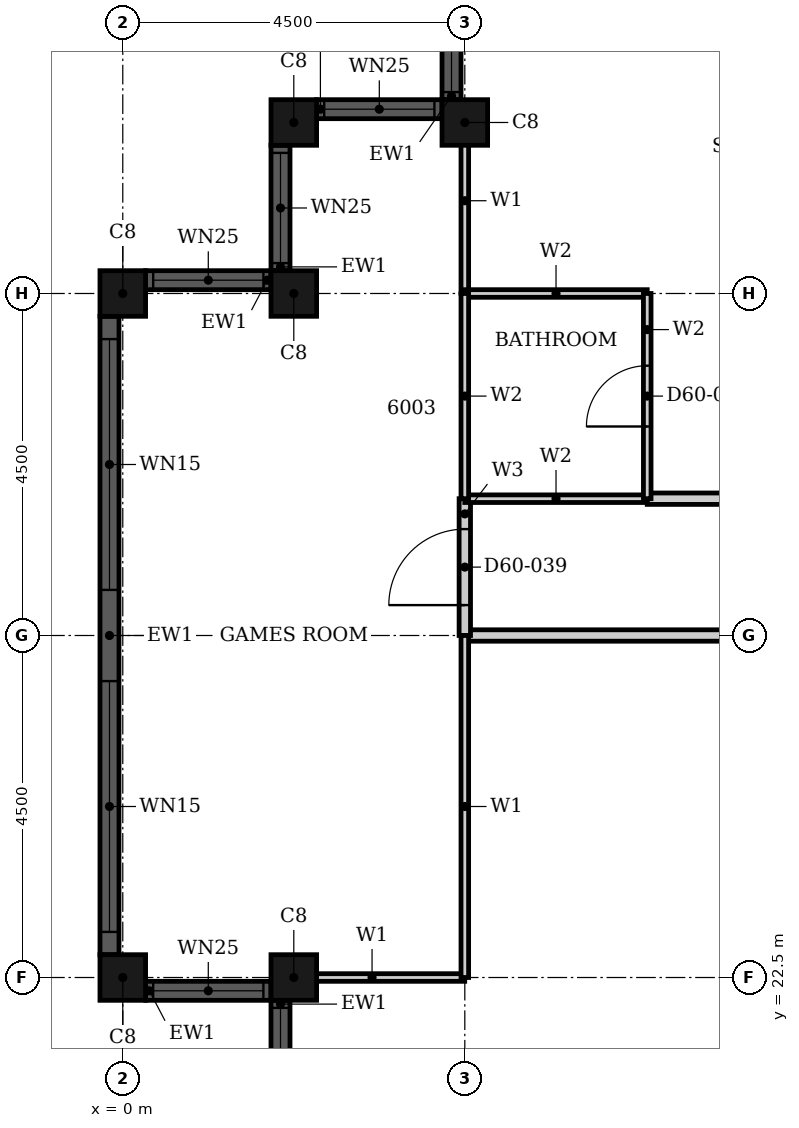
"""IFC4 building model, lengths in metres.
Left out: names, types, materials, properties, quantities, classifications, styles, units other than length and angle.
Written with IfcOpenShell. Run it as: python <this file> out.ifc"""

import sys

from ifc_helpers import new_model, si_unit, direction, frame, frame_2d, origin, origin_2d, place, context, subcontext, project, spatial, rectangle, hollow_rectangle, extrude, element, fill, save


model = new_model("IFC4")
c1 = context("Model", 3, precision=1e-05, world=origin(), true_north=direction((0.0, 1.0)))
c2 = subcontext(c1, "Body", "Model", "MODEL_VIEW")
j1 = project(units=[si_unit("LENGTHUNIT", "METRE"), si_unit("PLANEANGLEUNIT", "RADIAN")], contexts=[c1])
p1 = place(None, origin())
s1 = spatial("IfcSite", under=j1, at=p1, CompositionType="ELEMENT")
p2 = place(p1, origin())
s2 = spatial("IfcBuilding", under=s1, at=p2, CompositionType="ELEMENT")
p3 = place(p2, frame((0.0, 0.0, 237.9)))
s3 = spatial("IfcBuildingStorey", under=s2, at=p3, CompositionType="ELEMENT", Elevation=237.9)
for number, where, z_axis, x_axis in (
    (1, (4.5, 33.75, 0.0), (0.0, 0.0, 1.0), (1.0, 0.0, 0.0)),
    (2, (2.25, 33.75, 0.0), (0.0, 0.0, 1.0), (1.0, 0.0, 0.0)),
    (3, (2.25, 31.5, 0.0), (0.0, 0.0, 1.0), (1.0, 0.0, 0.0)),
    (4, (0.0, 31.5, 0.0), (0.0, 0.0, 1.0), (1.0, 0.0, 0.0)),
    (5, (0.0, 22.5, 0.0), (0.0, 0.0, 1.0), (1.0, 0.0, 0.0)),
    (6, (2.25, 22.5, 0.0), (0.0, 0.0, 1.0), (1.0, 0.0, 0.0)),
):
    element("IfcColumn", number, at=place(p3, frame(where, z_axis=z_axis, x_axis=x_axis)), inside=s3, PredefinedType="COLUMN", context=c2, shape_type="SweptSolid", body=[
        extrude(hollow_rectangle(XDim=0.6, YDim=0.6, WallThickness=0.02, at=origin_2d()), origin(), (0.0, 0.0, 1.0), 3.7),
    ])
p4 = place(p3, frame((4.325, 35.7, 0.0), z_axis=(0.0, 0.0, 1.0), x_axis=(0.0, -1.0, 0.0)))
e7 = element("IfcWall", 7, at=p4, inside=s3, PredefinedType="SOLIDWALL", context=c2, shape_type="SweptSolid", body=[
    extrude(rectangle(XDim=1.65, YDim=0.25, at=frame_2d((0.825, 0.0))), origin(), (0.0, 0.0, 1.0), 3.7),
])
p5 = place(p4, frame((0.1, 0.0, 0.9)))
e8 = element("IfcOpeningElement", 8, at=p5, cuts=e7, PredefinedType="OPENING", context=c2, shape_type="SweptSolid", body=[
    extrude(rectangle(XDim=1.45, YDim=1.85, at=frame_2d((0.725, 0.925))), frame((0.0, 0.135, 0.0), z_axis=(0.0, -1.0, 0.0), x_axis=(1.0, 0.0, 0.0)), (0.0, 0.0, 1.0), 0.27),
])
p6 = place(p3, frame((4.2, 33.925, 0.0), z_axis=(0.0, 0.0, 1.0), x_axis=(-1.0, 0.0, 0.0)))
e9 = element("IfcWall", 9, at=p6, inside=s3, PredefinedType="SOLIDWALL", context=c2, shape_type="SweptSolid", body=[
    extrude(rectangle(XDim=1.65, YDim=0.25, at=frame_2d((0.825, 0.0))), origin(), (0.0, 0.0, 1.0), 3.7),
])
p7 = place(p6, frame((0.1, 0.0, 0.9)))
e10 = element("IfcOpeningElement", 10, at=p7, cuts=e9, PredefinedType="OPENING", context=c2, shape_type="SweptSolid", body=[
    extrude(rectangle(XDim=1.45, YDim=1.85, at=frame_2d((0.725, 0.925))), frame((0.0, 0.135, 0.0), z_axis=(0.0, -1.0, 0.0), x_axis=(1.0, 0.0, 0.0)), (0.0, 0.0, 1.0), 0.27),
])
p8 = place(p3, frame((2.075, 33.45, 0.0), z_axis=(0.0, 0.0, 1.0), x_axis=(0.0, -1.0, 0.0)))
e11 = element("IfcWall", 11, at=p8, inside=s3, PredefinedType="SOLIDWALL", context=c2, shape_type="SweptSolid", body=[
    extrude(rectangle(XDim=1.65, YDim=0.25, at=frame_2d((0.825, 0.0))), origin(), (0.0, 0.0, 1.0), 3.7),
])
p9 = place(p8, frame((0.1, 0.0, 0.9)))
e12 = element("IfcOpeningElement", 12, at=p9, cuts=e11, PredefinedType="OPENING", context=c2, shape_type="SweptSolid", body=[
    extrude(rectangle(XDim=1.45, YDim=1.85, at=frame_2d((0.725, 0.925))), frame((0.0, 0.135, 0.0), z_axis=(0.0, -1.0, 0.0), x_axis=(1.0, 0.0, 0.0)), (0.0, 0.0, 1.0), 0.27),
])
p10 = place(p3, frame((1.95, 31.675, 0.0), z_axis=(0.0, 0.0, 1.0), x_axis=(-1.0, 0.0, 0.0)))
e13 = element("IfcWall", 13, at=p10, inside=s3, PredefinedType="SOLIDWALL", context=c2, shape_type="SweptSolid", body=[
    extrude(rectangle(XDim=1.65, YDim=0.25, at=frame_2d((0.825, 0.0))), origin(), (0.0, 0.0, 1.0), 3.7),
])
p11 = place(p10, frame((0.1, 0.0, 0.9)))
e14 = element("IfcOpeningElement", 14, at=p11, cuts=e13, PredefinedType="OPENING", context=c2, shape_type="SweptSolid", body=[
    extrude(rectangle(XDim=1.45, YDim=1.85, at=frame_2d((0.725, 0.925))), frame((0.0, 0.135, 0.0), z_axis=(0.0, -1.0, 0.0), x_axis=(1.0, 0.0, 0.0)), (0.0, 0.0, 1.0), 0.27),
])
p12 = place(p3, frame((-0.175, 31.2, 0.0), z_axis=(0.0, 0.0, 1.0), x_axis=(0.0, -1.0, 0.0)))
e15 = element("IfcWall", 15, at=p12, inside=s3, PredefinedType="SOLIDWALL", context=c2, shape_type="SweptSolid", body=[
    extrude(rectangle(XDim=8.4, YDim=0.25, at=frame_2d((4.2, 0.0))), origin(), (0.0, 0.0, 1.0), 3.7),
])
p13 = place(p12, frame((0.3, 0.0, 0.45)))
e16 = element("IfcOpeningElement", 16, at=p13, cuts=e15, PredefinedType="OPENING", context=c2, shape_type="SweptSolid", body=[
    extrude(rectangle(XDim=3.3, YDim=2.3, at=frame_2d((1.65, 1.15))), frame((0.0, 0.135, 0.0), z_axis=(0.0, -1.0, 0.0), x_axis=(1.0, 0.0, 0.0)), (0.0, 0.0, 1.0), 0.27),
])
p14 = place(p12, frame((4.8, 0.0, 0.45)))
e17 = element("IfcOpeningElement", 17, at=p14, cuts=e15, PredefinedType="OPENING", context=c2, shape_type="SweptSolid", body=[
    extrude(rectangle(XDim=3.3, YDim=2.3, at=frame_2d((1.65, 1.15))), frame((0.0, 0.135, 0.0), z_axis=(0.0, -1.0, 0.0), x_axis=(1.0, 0.0, 0.0)), (0.0, 0.0, 1.0), 0.27),
])
p15 = place(p3, frame((0.3, 22.325, 0.0), z_axis=(0.0, 0.0, 1.0), x_axis=(1.0, 0.0, 0.0)))
e18 = element("IfcWall", 18, at=p15, inside=s3, PredefinedType="SOLIDWALL", context=c2, shape_type="SweptSolid", body=[
    extrude(rectangle(XDim=1.65, YDim=0.25, at=frame_2d((0.825, 0.0))), origin(), (0.0, 0.0, 1.0), 3.7),
])
p16 = place(p15, frame((0.1, 0.0, 0.9)))
e19 = element("IfcOpeningElement", 19, at=p16, cuts=e18, PredefinedType="OPENING", context=c2, shape_type="SweptSolid", body=[
    extrude(rectangle(XDim=1.45, YDim=1.85, at=frame_2d((0.725, 0.925))), frame((0.0, 0.135, 0.0), z_axis=(0.0, -1.0, 0.0), x_axis=(1.0, 0.0, 0.0)), (0.0, 0.0, 1.0), 0.27),
])
p17 = place(p3, frame((2.075, 22.2, 0.0), z_axis=(0.0, 0.0, 1.0), x_axis=(0.0, -1.0, 0.0)))
e20 = element("IfcWall", 20, at=p17, inside=s3, PredefinedType="SOLIDWALL", context=c2, shape_type="SweptSolid", body=[
    extrude(rectangle(XDim=1.65, YDim=0.25, at=frame_2d((0.825, 0.0))), origin(), (0.0, 0.0, 1.0), 3.7),
])
p18 = place(p17, frame((0.1, 0.0, 0.9)))
e21 = element("IfcOpeningElement", 21, at=p18, cuts=e20, PredefinedType="OPENING", context=c2, shape_type="SweptSolid", body=[
    extrude(rectangle(XDim=1.45, YDim=1.85, at=frame_2d((0.725, 0.925))), frame((0.0, 0.135, 0.0), z_axis=(0.0, -1.0, 0.0), x_axis=(1.0, 0.0, 0.0)), (0.0, 0.0, 1.0), 0.27),
])
p19 = place(p3, frame((4.5, 27.0, 0.0), z_axis=(0.0, 0.0, 1.0), x_axis=(1.0, 0.0, 0.0)))
e22 = element("IfcWall", 22, at=p19, inside=s3, PredefinedType="PARTITIONING", context=c2, shape_type="SweptSolid", body=[
    extrude(rectangle(XDim=13.5, YDim=0.15, at=frame_2d((6.75, 0.0))), origin(), (0.0, 0.0, 1.0), 2.68),
])
p20 = place(p19, frame((5.35, 0.0, 0.0)))
e23 = element("IfcOpeningElement", 23, at=p20, cuts=e22, PredefinedType="OPENING", context=c2, shape_type="SweptSolid", body=[
    extrude(rectangle(XDim=1.0, YDim=2.1, at=frame_2d((0.5, 1.05))), frame((0.0, 0.085, 0.0), z_axis=(0.0, -1.0, 0.0), x_axis=(1.0, 0.0, 0.0)), (0.0, 0.0, 1.0), 0.17),
])
p21 = place(p3, frame((6.9, 28.8, 0.0), z_axis=(0.0, 0.0, 1.0), x_axis=(1.0, 0.0, 0.0)))
e24 = element("IfcWall", 24, at=p21, inside=s3, PredefinedType="PARTITIONING", context=c2, shape_type="SweptSolid", body=[
    extrude(rectangle(XDim=9.299, YDim=0.15, at=frame_2d((4.649, 0.0))), origin(), (0.0, 0.0, 1.0), 3.4),
])
p22 = place(p3, frame((4.5, 27.0, 0.0), z_axis=(0.0, 0.0, 1.0), x_axis=(0.0, 1.0, 0.0)))
e25 = element("IfcWall", 25, at=p22, inside=s3, PredefinedType="PARTITIONING", context=c2, shape_type="SweptSolid", body=[
    extrude(rectangle(XDim=1.8, YDim=0.15, at=frame_2d((0.9, 0.0))), origin(), (0.0, 0.0, 1.0), 3.4),
])
p23 = place(p22, frame((0.4, 0.0, 0.0)))
e26 = element("IfcOpeningElement", 26, at=p23, cuts=e25, PredefinedType="OPENING", context=c2, shape_type="SweptSolid", body=[
    extrude(rectangle(XDim=1.0, YDim=2.1, at=frame_2d((0.5, 1.05))), frame((0.0, 0.085, 0.0), z_axis=(0.0, -1.0, 0.0), x_axis=(1.0, 0.0, 0.0)), (0.0, 0.0, 1.0), 0.17),
])
p24 = place(p3, frame((2.06, 22.5, 0.0), z_axis=(0.0, 0.0, 1.0), x_axis=(1.0, 0.0, 0.0)))
e27 = element("IfcWall", 27, at=p24, inside=s3, PredefinedType="PARTITIONING", context=c2, shape_type="SweptSolid", body=[
    extrude(rectangle(XDim=2.439, YDim=0.1, at=frame_2d((1.219, 0.0))), origin(), (0.0, 0.0, 1.0), 2.68),
])
p25 = place(p3, frame((4.5, 31.501, 0.0), z_axis=(0.0, 0.0, 1.0), x_axis=(0.0, 1.0, 0.0)))
e28 = element("IfcWall", 28, at=p25, inside=s3, PredefinedType="PARTITIONING", context=c2, shape_type="SweptSolid", body=[
    extrude(rectangle(XDim=2.439, YDim=0.1, at=frame_2d((1.219, 0.0))), origin(), (0.0, 0.0, 1.0), 3.4),
])
p26 = place(p3, frame((4.5, 22.5, 0.0), z_axis=(0.0, 0.0, 1.0), x_axis=(0.0, 1.0, 0.0)))
e29 = element("IfcWall", 29, at=p26, inside=s3, PredefinedType="PARTITIONING", context=c2, shape_type="SweptSolid", body=[
    extrude(rectangle(XDim=4.5, YDim=0.1, at=frame_2d((2.25, 0.0))), origin(), (0.0, 0.0, 1.0), 3.4),
])
p27 = place(p3, frame((4.5, 28.8, 0.0), z_axis=(0.0, 0.0, 1.0), x_axis=(1.0, 0.0, 0.0)))
e30 = element("IfcWall", 30, at=p27, inside=s3, PredefinedType="PARTITIONING", context=c2, shape_type="SweptSolid", body=[
    extrude(rectangle(XDim=2.4, YDim=0.1, at=frame_2d((1.2, 0.0))), origin(), (0.0, 0.0, 1.0), 3.4),
])
p28 = place(p3, frame((4.5, 31.5, 0.0), z_axis=(0.0, 0.0, 1.0), x_axis=(1.0, 0.0, 0.0)))
e31 = element("IfcWall", 31, at=p28, inside=s3, PredefinedType="PARTITIONING", context=c2, shape_type="SweptSolid", body=[
    extrude(rectangle(XDim=2.4, YDim=0.1, at=frame_2d((1.2, 0.0))), origin(), (0.0, 0.0, 1.0), 2.68),
])
p29 = place(p3, frame((4.5, 28.8, 0.0), z_axis=(0.0, 0.0, 1.0), x_axis=(0.0, 1.0, 0.0)))
e32 = element("IfcWall", 32, at=p29, inside=s3, PredefinedType="PARTITIONING", context=c2, shape_type="SweptSolid", body=[
    extrude(rectangle(XDim=2.7, YDim=0.1, at=frame_2d((1.35, 0.0))), origin(), (0.0, 0.0, 1.0), 3.4),
])
p30 = place(p3, frame((6.9, 28.8, 0.0), z_axis=(0.0, 0.0, 1.0), x_axis=(0.0, 1.0, 0.0)))
e33 = element("IfcWall", 33, at=p30, inside=s3, PredefinedType="PARTITIONING", context=c2, shape_type="SweptSolid", body=[
    extrude(rectangle(XDim=2.7, YDim=0.1, at=frame_2d((1.35, 0.0))), origin(), (0.0, 0.0, 1.0), 3.4),
])
p31 = place(p30, frame((0.95, 0.0, 0.0)))
e34 = element("IfcOpeningElement", 34, at=p31, cuts=e33, PredefinedType="OPENING", context=c2, shape_type="SweptSolid", body=[
    extrude(rectangle(XDim=0.8, YDim=2.1, at=frame_2d((0.4, 1.05))), frame((0.0, 0.06, 0.0), z_axis=(0.0, -1.0, 0.0), x_axis=(1.0, 0.0, 0.0)), (0.0, 0.0, 1.0), 0.12),
])
p32 = place(p5, origin())
e35 = element("IfcWindow", 35, at=p32, inside=s3, PartitioningType="SINGLE_PANEL", PredefinedType="WINDOW", context=c2, shape_type="SweptSolid", body=[
    extrude(rectangle(XDim=1.45, YDim=1.85, at=frame_2d((0.725, 0.925))), frame((0.0, 0.03, 0.0), z_axis=(0.0, -1.0, 0.0), x_axis=(1.0, 0.0, 0.0)), (0.0, 0.0, 1.0), 0.06),
])
fill(e8, e35)
p33 = place(p7, origin())
e36 = element("IfcWindow", 36, at=p33, inside=s3, PartitioningType="SINGLE_PANEL", PredefinedType="WINDOW", context=c2, shape_type="SweptSolid", body=[
    extrude(rectangle(XDim=1.45, YDim=1.85, at=frame_2d((0.725, 0.925))), frame((0.0, 0.03, 0.0), z_axis=(0.0, -1.0, 0.0), x_axis=(1.0, 0.0, 0.0)), (0.0, 0.0, 1.0), 0.06),
])
fill(e10, e36)
p34 = place(p9, origin())
e37 = element("IfcWindow", 37, at=p34, inside=s3, PartitioningType="SINGLE_PANEL", PredefinedType="WINDOW", context=c2, shape_type="SweptSolid", body=[
    extrude(rectangle(XDim=1.45, YDim=1.85, at=frame_2d((0.725, 0.925))), frame((0.0, 0.03, 0.0), z_axis=(0.0, -1.0, 0.0), x_axis=(1.0, 0.0, 0.0)), (0.0, 0.0, 1.0), 0.06),
])
fill(e12, e37)
p35 = place(p11, origin())
e38 = element("IfcWindow", 38, at=p35, inside=s3, PartitioningType="SINGLE_PANEL", PredefinedType="WINDOW", context=c2, shape_type="SweptSolid", body=[
    extrude(rectangle(XDim=1.45, YDim=1.85, at=frame_2d((0.725, 0.925))), frame((0.0, 0.03, 0.0), z_axis=(0.0, -1.0, 0.0), x_axis=(1.0, 0.0, 0.0)), (0.0, 0.0, 1.0), 0.06),
])
fill(e14, e38)
p36 = place(p13, origin())
e39 = element("IfcWindow", 39, at=p36, inside=s3, PartitioningType="SINGLE_PANEL", PredefinedType="WINDOW", context=c2, shape_type="SweptSolid", body=[
    extrude(rectangle(XDim=3.3, YDim=2.3, at=frame_2d((1.65, 1.15))), frame((0.0, 0.03, 0.0), z_axis=(0.0, -1.0, 0.0), x_axis=(1.0, 0.0, 0.0)), (0.0, 0.0, 1.0), 0.06),
])
fill(e16, e39)
p37 = place(p14, origin())
e40 = element("IfcWindow", 40, at=p37, inside=s3, PartitioningType="SINGLE_PANEL", PredefinedType="WINDOW", context=c2, shape_type="SweptSolid", body=[
    extrude(rectangle(XDim=3.3, YDim=2.3, at=frame_2d((1.65, 1.15))), frame((0.0, 0.03, 0.0), z_axis=(0.0, -1.0, 0.0), x_axis=(1.0, 0.0, 0.0)), (0.0, 0.0, 1.0), 0.06),
])
fill(e17, e40)
p38 = place(p16, origin())
e41 = element("IfcWindow", 41, at=p38, inside=s3, PartitioningType="SINGLE_PANEL", PredefinedType="WINDOW", context=c2, shape_type="SweptSolid", body=[
    extrude(rectangle(XDim=1.45, YDim=1.85, at=frame_2d((0.725, 0.925))), frame((0.0, 0.03, 0.0), z_axis=(0.0, -1.0, 0.0), x_axis=(1.0, 0.0, 0.0)), (0.0, 0.0, 1.0), 0.06),
])
fill(e19, e41)
p39 = place(p18, origin())
e42 = element("IfcWindow", 42, at=p39, inside=s3, PartitioningType="SINGLE_PANEL", PredefinedType="WINDOW", context=c2, shape_type="SweptSolid", body=[
    extrude(rectangle(XDim=1.45, YDim=1.85, at=frame_2d((0.725, 0.925))), frame((0.0, 0.03, 0.0), z_axis=(0.0, -1.0, 0.0), x_axis=(1.0, 0.0, 0.0)), (0.0, 0.0, 1.0), 0.06),
])
fill(e21, e42)
p40 = place(p31, origin())
e43 = element("IfcDoor", 43, at=p40, inside=s3, OperationType="SINGLE_SWING_RIGHT", PredefinedType="DOOR", context=c2, shape_type="SweptSolid", body=[
    extrude(rectangle(XDim=0.8, YDim=2.1, at=frame_2d((0.4, 1.05))), frame((0.0, 0.025, 0.0), z_axis=(0.0, -1.0, 0.0), x_axis=(1.0, 0.0, 0.0)), (0.0, 0.0, 1.0), 0.05),
])
fill(e34, e43)
p41 = place(p23, origin())
e44 = element("IfcDoor", 44, at=p41, inside=s3, OperationType="SINGLE_SWING_RIGHT", PredefinedType="DOOR", context=c2, shape_type="SweptSolid", body=[
    extrude(rectangle(XDim=1.0, YDim=2.1, at=frame_2d((0.5, 1.05))), frame((0.0, 0.025, 0.0), z_axis=(0.0, -1.0, 0.0), x_axis=(1.0, 0.0, 0.0)), (0.0, 0.0, 1.0), 0.05),
])
fill(e26, e44)
save(model, sys.argv[1])
